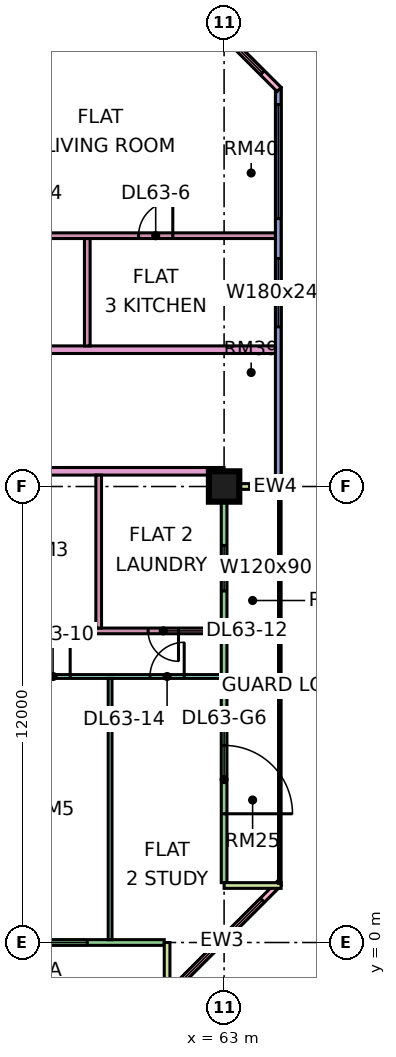
"""IFC4 building model, lengths in metres.
Left out: names, types, materials, properties, quantities, classifications, styles, units other than length and angle.
Written with IfcOpenShell. Run it as: python <this file> out.ifc"""

import sys

from ifc_helpers import new_model, si_unit, direction, frame, frame_2d, origin, origin_2d, place, context, subcontext, project, spatial, rectangle, extrude, element, fill, save


model = new_model("IFC4")
c1 = context("Model", 3, precision=1e-05, world=origin(), true_north=direction((0.0, 1.0)))
c2 = subcontext(c1, "Body", "Model", "MODEL_VIEW")
j1 = project(units=[si_unit("LENGTHUNIT", "METRE"), si_unit("PLANEANGLEUNIT", "RADIAN")], contexts=[c1])
p1 = place(None, origin())
s1 = spatial("IfcSite", under=j1, at=p1, CompositionType="ELEMENT")
p2 = place(p1, origin())
s2 = spatial("IfcBuilding", under=s1, at=p2, CompositionType="ELEMENT")
p3 = place(p2, frame((0.0, 0.0, 273.4)))
s3 = spatial("IfcBuildingStorey", under=s2, at=p3, CompositionType="ELEMENT", Elevation=273.4)
p4 = place(p3, frame((63.0, 12.0, 0.0), z_axis=(0.0, 0.0, 1.0), x_axis=(1.0, 0.0, 0.0)))
e1 = element("IfcColumn", 1, at=p4, inside=s3, PredefinedType="COLUMN", context=c2, shape_type="SweptSolid", body=[
    extrude(rectangle(XDim=0.8, YDim=0.8, at=origin_2d()), origin(), (0.0, 0.0, 1.0), 3.75),
])
p5 = place(p3, frame((48.075, 0.0, 0.0), z_axis=(0.0, 0.0, 1.0), x_axis=(1.0, 0.0, 0.0)))
e2 = element("IfcWall", 2, at=p5, inside=s3, PredefinedType="SOLIDWALL", context=c2, shape_type="SweptSolid", body=[
    extrude(rectangle(XDim=13.35, YDim=0.15, at=frame_2d((6.675, 0.0))), origin(), (0.0, 0.0, 1.0), 3.35),
])
p6 = place(p5, frame((1.812, 0.0, 0.0)))
e3 = element("IfcOpeningElement", 3, at=p6, cuts=e2, PredefinedType="OPENING", context=c2, shape_type="SweptSolid", body=[
    extrude(rectangle(XDim=1.8, YDim=2.4, at=frame_2d((0.9, 1.2))), frame((0.0, 0.085, 0.0), z_axis=(0.0, -1.0, 0.0), x_axis=(1.0, 0.0, 0.0)), (0.0, 0.0, 1.0), 0.17),
])
p7 = place(p5, frame((6.775, 0.0, 0.45)))
e4 = element("IfcOpeningElement", 4, at=p7, cuts=e2, PredefinedType="OPENING", context=c2, shape_type="SweptSolid", body=[
    extrude(rectangle(XDim=1.8, YDim=2.4, at=frame_2d((0.9, 1.2))), frame((0.0, 0.085, 0.0), z_axis=(0.0, -1.0, 0.0), x_axis=(1.0, 0.0, 0.0)), (0.0, 0.0, 1.0), 0.17),
])
p8 = place(p5, frame((9.525, 0.0, 0.45)))
e5 = element("IfcOpeningElement", 5, at=p8, cuts=e2, PredefinedType="OPENING", context=c2, shape_type="SweptSolid", body=[
    extrude(rectangle(XDim=1.8, YDim=2.4, at=frame_2d((0.9, 1.2))), frame((0.0, 0.085, 0.0), z_axis=(0.0, -1.0, 0.0), x_axis=(1.0, 0.0, 0.0)), (0.0, 0.0, 1.0), 0.17),
])
p9 = place(p3, frame((61.5, -1.5, 0.0), z_axis=(0.0, 0.0, 1.0), x_axis=(0.0, 1.0, 0.0)))
e6 = element("IfcWall", 6, at=p9, inside=s3, PredefinedType="SOLIDWALL", context=c2, shape_type="SweptSolid", body=[
    extrude(rectangle(XDim=1.5, YDim=0.15, at=frame_2d((0.75, 0.0))), origin(), (0.0, 0.0, 1.0), 3.35),
])
p10 = place(p3, frame((61.447, -1.447, 0.0), z_axis=(0.0, 0.0, 1.0), x_axis=(0.707106781187, 0.707106781187, 0.0)))
e7 = element("IfcWall", 7, at=p10, inside=s3, PredefinedType="SOLIDWALL", context=c2, shape_type="SweptSolid", body=[
    extrude(rectangle(XDim=4.243, YDim=0.15, at=frame_2d((2.121, 0.0))), origin(), (0.0, 0.0, 1.0), 3.35),
])
p11 = place(p10, frame((0.621, 0.0, 0.45)))
e8 = element("IfcOpeningElement", 8, at=p11, cuts=e7, PredefinedType="OPENING", context=c2, shape_type="SweptSolid", body=[
    extrude(rectangle(XDim=3.0, YDim=2.4, at=frame_2d((1.5, 1.2))), frame((0.0, 0.085, 0.0), z_axis=(0.0, -1.0, 0.0), x_axis=(1.0, 0.0, 0.0)), (0.0, 0.0, 1.0), 0.17),
])
p12 = place(p3, frame((63.0, 1.575, 0.0), z_axis=(0.0, 0.0, 1.0), x_axis=(0.0, 1.0, 0.0)))
e9 = element("IfcWall", 9, at=p12, inside=s3, PredefinedType="SOLIDWALL", context=c2, shape_type="SweptSolid", body=[
    extrude(rectangle(XDim=10.35, YDim=0.15, at=frame_2d((5.175, 0.0))), origin(), (0.0, 0.0, 1.0), 3.35),
])
p13 = place(p12, frame((1.812, 0.0, 0.0)))
e10 = element("IfcOpeningElement", 10, at=p13, cuts=e9, PredefinedType="OPENING", context=c2, shape_type="SweptSolid", body=[
    extrude(rectangle(XDim=1.8, YDim=2.4, at=frame_2d((0.9, 1.2))), frame((0.0, 0.085, 0.0), z_axis=(0.0, -1.0, 0.0), x_axis=(1.0, 0.0, 0.0)), (0.0, 0.0, 1.0), 0.17),
])
p14 = place(p12, frame((7.675, 0.0, 1.7)))
e11 = element("IfcOpeningElement", 11, at=p14, cuts=e9, PredefinedType="OPENING", context=c2, shape_type="SweptSolid", body=[
    extrude(rectangle(XDim=1.2, YDim=0.9, at=frame_2d((0.6, 0.45))), frame((0.0, 0.085, 0.0), z_axis=(0.0, -1.0, 0.0), x_axis=(1.0, 0.0, 0.0)), (0.0, 0.0, 1.0), 0.17),
])
for number, where, z_axis, x_axis in (
    (12, (64.5, 1.5, 0.0), (0.0, 0.0, 1.0), (-1.0, 0.0, 0.0)),
    (13, (64.5, 12.0, 0.0), (0.0, 0.0, 1.0), (-1.0, 0.0, 0.0)),
):
    element("IfcWall", number, at=place(p3, frame(where, z_axis=z_axis, x_axis=x_axis)), inside=s3, PredefinedType="SOLIDWALL", context=c2, shape_type="SweptSolid", body=[
        extrude(rectangle(XDim=1.5, YDim=0.15, at=frame_2d((0.75, 0.0))), origin(), (0.0, 0.0, 1.0), 3.35),
    ])
p15 = place(p3, frame((64.425, 12.075, 0.0), z_axis=(0.0, 0.0, 1.0), x_axis=(0.0, 1.0, 0.0)))
e14 = element("IfcWall", 14, at=p15, inside=s3, PredefinedType="SOLIDWALL", context=c2, shape_type="SweptSolid", body=[
    extrude(rectangle(XDim=10.425, YDim=0.15, at=frame_2d((5.212, 0.0))), origin(), (0.0, 0.0, 1.0), 3.35),
])
p16 = place(p15, frame((4.125, 0.0, 0.45)))
e15 = element("IfcOpeningElement", 15, at=p16, cuts=e14, PredefinedType="OPENING", context=c2, shape_type="SweptSolid", body=[
    extrude(rectangle(XDim=1.8, YDim=2.4, at=frame_2d((0.9, 1.2))), frame((0.0, 0.085, 0.0), z_axis=(0.0, -1.0, 0.0), x_axis=(1.0, 0.0, 0.0)), (0.0, 0.0, 1.0), 0.17),
])
p17 = place(p15, frame((6.975, 0.0, 0.45)))
e16 = element("IfcOpeningElement", 16, at=p17, cuts=e14, PredefinedType="OPENING", context=c2, shape_type="SweptSolid", body=[
    extrude(rectangle(XDim=3.0, YDim=2.4, at=frame_2d((1.5, 1.2))), frame((0.0, 0.085, 0.0), z_axis=(0.0, -1.0, 0.0), x_axis=(1.0, 0.0, 0.0)), (0.0, 0.0, 1.0), 0.17),
])
p18 = place(p3, frame((64.447, 22.447, 0.0), z_axis=(0.0, 0.0, 1.0), x_axis=(-0.707106781187, 0.707106781187, 0.0)))
e17 = element("IfcWall", 17, at=p18, inside=s3, PredefinedType="SOLIDWALL", context=c2, shape_type="SweptSolid", body=[
    extrude(rectangle(XDim=4.243, YDim=0.15, at=frame_2d((2.121, 0.0))), origin(), (0.0, 0.0, 1.0), 3.35),
])
p19 = place(p18, frame((0.621, 0.0, 0.45)))
e18 = element("IfcOpeningElement", 18, at=p19, cuts=e17, PredefinedType="OPENING", context=c2, shape_type="SweptSolid", body=[
    extrude(rectangle(XDim=3.0, YDim=2.4, at=frame_2d((1.5, 1.2))), frame((0.0, 0.085, 0.0), z_axis=(0.0, -1.0, 0.0), x_axis=(1.0, 0.0, 0.0)), (0.0, 0.0, 1.0), 0.17),
])
p20 = place(p3, frame((40.65, 12.4, 0.0), z_axis=(0.0, 0.0, 1.0), x_axis=(1.0, 0.0, 0.0)))
e19 = element("IfcWall", 19, at=p20, inside=s3, PredefinedType="PARTITIONING", context=c2, shape_type="SweptSolid", body=[
    extrude(rectangle(XDim=22.35, YDim=0.2, at=frame_2d((11.175, 0.0))), origin(), (0.0, 0.0, 1.0), 3.35),
])
p21 = place(p20, frame((14.25, 0.0, 0.0)))
e20 = element("IfcOpeningElement", 20, at=p21, cuts=e19, PredefinedType="OPENING", context=c2, shape_type="SweptSolid", body=[
    extrude(rectangle(XDim=1.0, YDim=2.1, at=frame_2d((0.5, 1.05))), frame((0.0, 0.11, 0.0), z_axis=(0.0, -1.0, 0.0), x_axis=(1.0, 0.0, 0.0)), (0.0, 0.0, 1.0), 0.22),
])
p22 = place(p20, frame((1.05, 0.0, 0.0)))
e21 = element("IfcOpeningElement", 21, at=p22, cuts=e19, PredefinedType="OPENING", context=c2, shape_type="SweptSolid", body=[
    extrude(rectangle(XDim=1.0, YDim=2.1, at=frame_2d((0.5, 1.05))), frame((0.0, 0.11, 0.0), z_axis=(0.0, -1.0, 0.0), x_axis=(1.0, 0.0, 0.0)), (0.0, 0.0, 1.0), 0.22),
])
p23 = place(p3, frame((51.225, 15.6, 0.0), z_axis=(0.0, 0.0, 1.0), x_axis=(1.0, 0.0, 0.0)))
e22 = element("IfcWall", 22, at=p23, inside=s3, PredefinedType="PARTITIONING", context=c2, shape_type="SweptSolid", body=[
    extrude(rectangle(XDim=13.125, YDim=0.2, at=frame_2d((6.562, 0.0))), origin(), (0.0, 0.0, 1.0), 3.35),
])
p24 = place(p23, frame((3.425, 0.0, 0.0)))
e23 = element("IfcOpeningElement", 23, at=p24, cuts=e22, PredefinedType="OPENING", context=c2, shape_type="SweptSolid", body=[
    extrude(rectangle(XDim=1.0, YDim=2.1, at=frame_2d((0.5, 1.05))), frame((0.0, 0.11, 0.0), z_axis=(0.0, -1.0, 0.0), x_axis=(1.0, 0.0, 0.0)), (0.0, 0.0, 1.0), 0.22),
])
p25 = place(p23, frame((0.875, 0.0, 0.0)))
e24 = element("IfcOpeningElement", 24, at=p25, cuts=e22, PredefinedType="OPENING", context=c2, shape_type="SweptSolid", body=[
    extrude(rectangle(XDim=1.0, YDim=2.1, at=frame_2d((0.5, 1.05))), frame((0.0, 0.11, 0.0), z_axis=(0.0, -1.0, 0.0), x_axis=(1.0, 0.0, 0.0)), (0.0, 0.0, 1.0), 0.22),
])
p26 = place(p3, frame((53.95, 7.0, 0.0), z_axis=(0.0, 0.0, 1.0), x_axis=(1.0, 0.0, 0.0)))
e25 = element("IfcWall", 25, at=p26, inside=s3, PredefinedType="PARTITIONING", context=c2, shape_type="SweptSolid", body=[
    extrude(rectangle(XDim=8.976, YDim=0.1, at=frame_2d((4.488, 0.0))), origin(), (0.0, 0.0, 1.0), 3.35),
])
p27 = place(p26, frame((1.1, 0.0, 0.0)))
e26 = element("IfcOpeningElement", 26, at=p27, cuts=e25, PredefinedType="OPENING", context=c2, shape_type="SweptSolid", body=[
    extrude(rectangle(XDim=0.9, YDim=2.1, at=frame_2d((0.45, 1.05))), frame((0.0, 0.06, 0.0), z_axis=(0.0, -1.0, 0.0), x_axis=(1.0, 0.0, 0.0)), (0.0, 0.0, 1.0), 0.12),
])
p28 = place(p26, frame((4.1, 0.0, 0.0)))
e27 = element("IfcOpeningElement", 27, at=p28, cuts=e25, PredefinedType="OPENING", context=c2, shape_type="SweptSolid", body=[
    extrude(rectangle(XDim=0.9, YDim=2.1, at=frame_2d((0.45, 1.05))), frame((0.0, 0.06, 0.0), z_axis=(0.0, -1.0, 0.0), x_axis=(1.0, 0.0, 0.0)), (0.0, 0.0, 1.0), 0.12),
])
p29 = place(p26, frame((7.1, 0.0, 0.0)))
e28 = element("IfcOpeningElement", 28, at=p29, cuts=e25, PredefinedType="OPENING", context=c2, shape_type="SweptSolid", body=[
    extrude(rectangle(XDim=0.9, YDim=2.1, at=frame_2d((0.45, 1.05))), frame((0.0, 0.06, 0.0), z_axis=(0.0, -1.0, 0.0), x_axis=(1.0, 0.0, 0.0)), (0.0, 0.0, 1.0), 0.12),
])
p30 = place(p3, frame((56.325, 18.6, 0.0), z_axis=(0.0, 0.0, 1.0), x_axis=(1.0, 0.0, 0.0)))
e29 = element("IfcWall", 29, at=p30, inside=s3, PredefinedType="PARTITIONING", context=c2, shape_type="SweptSolid", body=[
    extrude(rectangle(XDim=8.025, YDim=0.15, at=frame_2d((4.013, 0.0))), origin(), (0.0, 0.0, 1.0), 3.35),
])
p31 = place(p30, frame((1.125, 0.0, 0.0)))
e30 = element("IfcOpeningElement", 30, at=p31, cuts=e29, PredefinedType="OPENING", context=c2, shape_type="SweptSolid", body=[
    extrude(rectangle(XDim=0.8, YDim=2.1, at=frame_2d((0.4, 1.05))), frame((0.0, 0.085, 0.0), z_axis=(0.0, -1.0, 0.0), x_axis=(1.0, 0.0, 0.0)), (0.0, 0.0, 1.0), 0.17),
])
p32 = place(p30, frame((4.425, 0.0, 0.0)))
e31 = element("IfcOpeningElement", 31, at=p32, cuts=e29, PredefinedType="OPENING", context=c2, shape_type="SweptSolid", body=[
    extrude(rectangle(XDim=0.9, YDim=2.1, at=frame_2d((0.45, 1.05))), frame((0.0, 0.085, 0.0), z_axis=(0.0, -1.0, 0.0), x_axis=(1.0, 0.0, 0.0)), (0.0, 0.0, 1.0), 0.17),
])
p33 = place(p3, frame((56.925, 8.2, 0.0), z_axis=(0.0, 0.0, 1.0), x_axis=(1.0, 0.0, 0.0)))
e32 = element("IfcWall", 32, at=p33, inside=s3, PredefinedType="PARTITIONING", context=c2, shape_type="SweptSolid", body=[
    extrude(rectangle(XDim=6.001, YDim=0.15, at=frame_2d((3.0, 0.0))), origin(), (0.0, 0.0, 1.0), 3.35),
])
p34 = place(p33, frame((4.075, 0.0, 0.0)))
e33 = element("IfcOpeningElement", 33, at=p34, cuts=e32, PredefinedType="OPENING", context=c2, shape_type="SweptSolid", body=[
    extrude(rectangle(XDim=0.8, YDim=2.1, at=frame_2d((0.4, 1.05))), frame((0.0, 0.085, 0.0), z_axis=(0.0, -1.0, 0.0), x_axis=(1.0, 0.0, 0.0)), (0.0, 0.0, 1.0), 0.17),
])
p35 = place(p3, frame((59.4, 15.7, 0.0), z_axis=(0.0, 0.0, 1.0), x_axis=(0.0, 1.0, 0.0)))
e34 = element("IfcWall", 34, at=p35, inside=s3, PredefinedType="PARTITIONING", context=c2, shape_type="SweptSolid", body=[
    extrude(rectangle(XDim=2.825, YDim=0.15, at=frame_2d((1.413, 0.0))), origin(), (0.0, 0.0, 1.0), 3.35),
])
p36 = place(p3, frame((59.7, 8.275, 0.0), z_axis=(0.0, 0.0, 1.0), x_axis=(0.0, 1.0, 0.0)))
e35 = element("IfcWall", 35, at=p36, inside=s3, PredefinedType="PARTITIONING", context=c2, shape_type="SweptSolid", body=[
    extrude(rectangle(XDim=4.025, YDim=0.15, at=frame_2d((2.013, 0.0))), origin(), (0.0, 0.0, 1.0), 3.35),
])
p37 = place(p3, frame((60.0, 0.074, 0.0), z_axis=(0.0, 0.0, 1.0), x_axis=(0.0, 1.0, 0.0)))
e36 = element("IfcWall", 36, at=p37, inside=s3, PredefinedType="PARTITIONING", context=c2, shape_type="SweptSolid", body=[
    extrude(rectangle(XDim=6.876, YDim=0.1, at=frame_2d((3.438, 0.0))), origin(), (0.0, 0.0, 1.0), 3.35),
])
p38 = place(p8, origin())
e37 = element("IfcWindow", 37, at=p38, inside=s3, PartitioningType="SINGLE_PANEL", PredefinedType="WINDOW", context=c2, shape_type="SweptSolid", body=[
    extrude(rectangle(XDim=1.8, YDim=2.4, at=frame_2d((0.9, 1.2))), frame((0.0, 0.03, 0.0), z_axis=(0.0, -1.0, 0.0), x_axis=(1.0, 0.0, 0.0)), (0.0, 0.0, 1.0), 0.06),
])
fill(e5, e37)
p39 = place(p11, origin())
e38 = element("IfcWindow", 38, at=p39, inside=s3, PartitioningType="SINGLE_PANEL", PredefinedType="WINDOW", context=c2, shape_type="SweptSolid", body=[
    extrude(rectangle(XDim=3.0, YDim=2.4, at=frame_2d((1.5, 1.2))), frame((0.0, 0.03, 0.0), z_axis=(0.0, -1.0, 0.0), x_axis=(1.0, 0.0, 0.0)), (0.0, 0.0, 1.0), 0.06),
])
fill(e8, e38)
p40 = place(p13, frame((1.8, 0.0, 0.0), z_axis=(0.0, 0.0, 1.0), x_axis=(-1.0, 0.0, 0.0)))
e39 = element("IfcDoor", 39, at=p40, inside=s3, OperationType="DOUBLE_DOOR_SINGLE_SWING", PredefinedType="DOOR", context=c2, shape_type="SweptSolid", body=[
    extrude(rectangle(XDim=1.8, YDim=2.4, at=frame_2d((0.9, 1.2))), frame((0.0, 0.025, 0.0), z_axis=(0.0, -1.0, 0.0), x_axis=(1.0, 0.0, 0.0)), (0.0, 0.0, 1.0), 0.05),
])
fill(e10, e39)
p41 = place(p14, origin())
e40 = element("IfcWindow", 40, at=p41, inside=s3, PartitioningType="SINGLE_PANEL", PredefinedType="WINDOW", context=c2, shape_type="SweptSolid", body=[
    extrude(rectangle(XDim=1.2, YDim=0.9, at=frame_2d((0.6, 0.45))), frame((0.0, 0.03, 0.0), z_axis=(0.0, -1.0, 0.0), x_axis=(1.0, 0.0, 0.0)), (0.0, 0.0, 1.0), 0.06),
])
fill(e11, e40)
p42 = place(p16, origin())
e41 = element("IfcWindow", 41, at=p42, inside=s3, PartitioningType="SINGLE_PANEL", PredefinedType="WINDOW", context=c2, shape_type="SweptSolid", body=[
    extrude(rectangle(XDim=1.8, YDim=2.4, at=frame_2d((0.9, 1.2))), frame((0.0, 0.03, 0.0), z_axis=(0.0, -1.0, 0.0), x_axis=(1.0, 0.0, 0.0)), (0.0, 0.0, 1.0), 0.06),
])
fill(e15, e41)
p43 = place(p17, origin())
e42 = element("IfcWindow", 42, at=p43, inside=s3, PartitioningType="SINGLE_PANEL", PredefinedType="WINDOW", context=c2, shape_type="SweptSolid", body=[
    extrude(rectangle(XDim=3.0, YDim=2.4, at=frame_2d((1.5, 1.2))), frame((0.0, 0.03, 0.0), z_axis=(0.0, -1.0, 0.0), x_axis=(1.0, 0.0, 0.0)), (0.0, 0.0, 1.0), 0.06),
])
fill(e16, e42)
p44 = place(p19, origin())
e43 = element("IfcWindow", 43, at=p44, inside=s3, PartitioningType="SINGLE_PANEL", PredefinedType="WINDOW", context=c2, shape_type="SweptSolid", body=[
    extrude(rectangle(XDim=3.0, YDim=2.4, at=frame_2d((1.5, 1.2))), frame((0.0, 0.03, 0.0), z_axis=(0.0, -1.0, 0.0), x_axis=(1.0, 0.0, 0.0)), (0.0, 0.0, 1.0), 0.06),
])
fill(e18, e43)
p45 = place(p32, frame((0.9, 0.0, 0.0), z_axis=(0.0, 0.0, 1.0), x_axis=(-1.0, 0.0, 0.0)))
e44 = element("IfcDoor", 44, at=p45, inside=s3, OperationType="SINGLE_SWING_RIGHT", PredefinedType="DOOR", context=c2, shape_type="SweptSolid", body=[
    extrude(rectangle(XDim=0.9, YDim=2.1, at=frame_2d((0.45, 1.05))), frame((0.0, 0.025, 0.0), z_axis=(0.0, -1.0, 0.0), x_axis=(1.0, 0.0, 0.0)), (0.0, 0.0, 1.0), 0.05),
])
fill(e31, e44)
p46 = place(p28, frame((0.9, 0.0, 0.0), z_axis=(0.0, 0.0, 1.0), x_axis=(-1.0, 0.0, 0.0)))
e45 = element("IfcDoor", 45, at=p46, inside=s3, OperationType="SINGLE_SWING_RIGHT", PredefinedType="DOOR", context=c2, shape_type="SweptSolid", body=[
    extrude(rectangle(XDim=0.9, YDim=2.1, at=frame_2d((0.45, 1.05))), frame((0.0, 0.025, 0.0), z_axis=(0.0, -1.0, 0.0), x_axis=(1.0, 0.0, 0.0)), (0.0, 0.0, 1.0), 0.05),
])
fill(e27, e45)
p47 = place(p34, origin())
e46 = element("IfcDoor", 46, at=p47, inside=s3, OperationType="SINGLE_SWING_RIGHT", PredefinedType="DOOR", context=c2, shape_type="SweptSolid", body=[
    extrude(rectangle(XDim=0.8, YDim=2.1, at=frame_2d((0.4, 1.05))), frame((0.0, 0.025, 0.0), z_axis=(0.0, -1.0, 0.0), x_axis=(1.0, 0.0, 0.0)), (0.0, 0.0, 1.0), 0.05),
])
fill(e33, e46)
p48 = place(p29, frame((0.9, 0.0, 0.0), z_axis=(0.0, 0.0, 1.0), x_axis=(-1.0, 0.0, 0.0)))
e47 = element("IfcDoor", 47, at=p48, inside=s3, OperationType="SINGLE_SWING_RIGHT", PredefinedType="DOOR", context=c2, shape_type="SweptSolid", body=[
    extrude(rectangle(XDim=0.9, YDim=2.1, at=frame_2d((0.45, 1.05))), frame((0.0, 0.025, 0.0), z_axis=(0.0, -1.0, 0.0), x_axis=(1.0, 0.0, 0.0)), (0.0, 0.0, 1.0), 0.05),
])
fill(e28, e47)
save(model, sys.argv[1])
